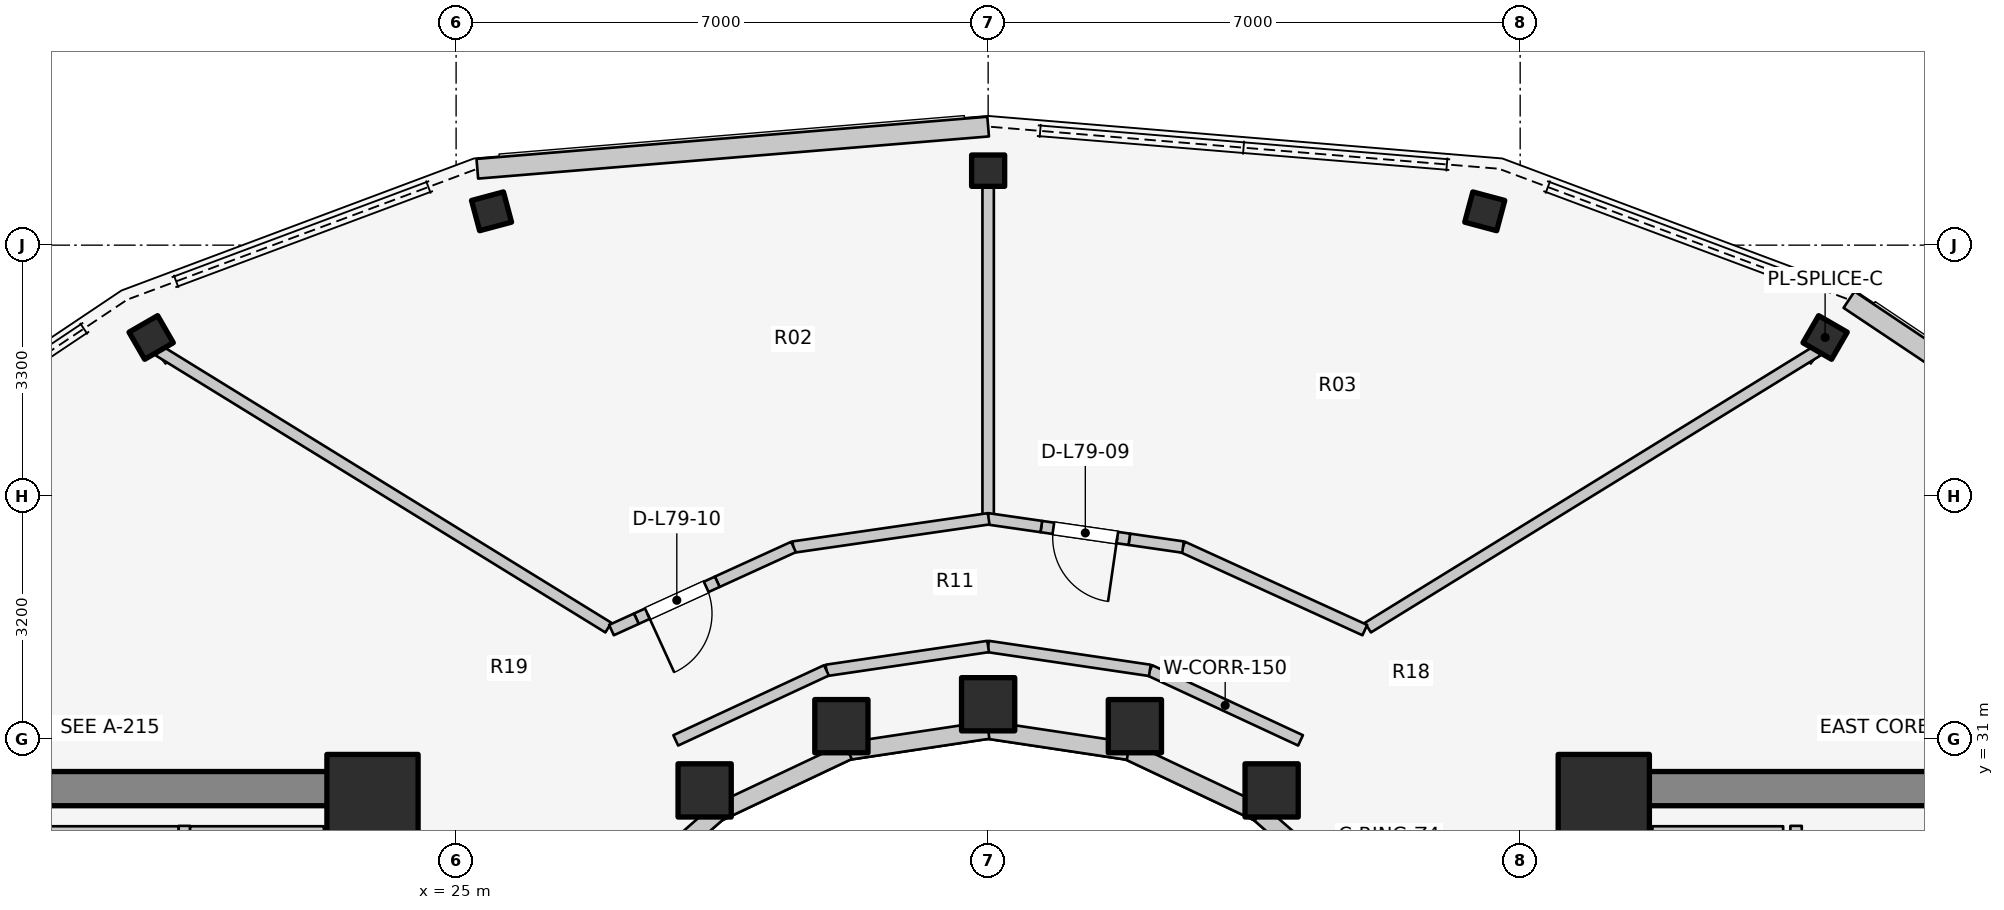
"""IFC4 building model, lengths in metres.
Left out: names, types, materials, properties, quantities, classifications, styles, units other than length and angle.
Written with IfcOpenShell. Run it as: python <this file> out.ifc"""

import sys

from ifc_helpers import new_model, si_unit, direction, frame, frame_2d, origin, origin_2d, place, context, subcontext, project, spatial, rectangle, i_section, extrude, element, fill, save


model = new_model("IFC4")
c1 = context("Model", 3, precision=1e-05, world=origin(), true_north=direction((0.0, 1.0)))
c2 = subcontext(c1, "Body", "Model", "MODEL_VIEW")
j1 = project(units=[si_unit("LENGTHUNIT", "METRE"), si_unit("PLANEANGLEUNIT", "RADIAN")], contexts=[c1])
p1 = place(None, origin())
s1 = spatial("IfcSite", under=j1, at=p1, CompositionType="ELEMENT")
p2 = place(p1, origin())
s2 = spatial("IfcBuilding", under=s1, at=p2, CompositionType="ELEMENT")
p3 = place(p2, frame((0.0, 0.0, 260.4)))
s3 = spatial("IfcBuildingStorey", under=s2, at=p3, CompositionType="ELEMENT", Elevation=260.4)
for number, where, z_axis, x_axis in (
    (1, (19.65, 30.35, 0.0), (0.0, 0.0, 1.0), (1.0, 0.0, 0.0)),
    (2, (39.85, 30.35, 0.0), (0.0, 0.0, 1.0), (1.0, 0.0, 0.0)),
):
    element("IfcWall", number, at=place(p3, frame(where, z_axis=z_axis, x_axis=x_axis)), inside=s3, PredefinedType="SHEAR", context=c2, shape_type="SweptSolid", body=[
        extrude(rectangle(XDim=4.5, YDim=0.45, at=frame_2d((2.25, 0.0))), origin(), (0.0, 0.0, 1.0), 3.2),
    ])
for number, where, z_axis, x_axis in (
    (3, (23.9, 30.2, 0.0), (0.0, 0.0, 1.0), (1.0, 0.0, 0.0)),
    (4, (40.1, 30.2, 0.0), (0.0, 0.0, 1.0), (1.0, 0.0, 0.0)),
):
    element("IfcColumn", number, at=place(p3, frame(where, z_axis=z_axis, x_axis=x_axis)), inside=s3, PredefinedType="COLUMN", context=c2, shape_type="SweptSolid", body=[
        extrude(rectangle(XDim=1.2, YDim=1.2, at=origin_2d()), origin(), (0.0, 0.0, 1.0), 3.2),
    ])
p4 = place(p3, frame((35.73, 30.327, 0.0), z_axis=(0.0, 0.0, 1.0), x_axis=(1.0, 0.0, 0.0)))
e5 = element("IfcColumn", 5, at=p4, inside=s3, PredefinedType="COLUMN", context=c2, shape_type="SweptSolid", body=[
    extrude(rectangle(XDim=0.7, YDim=0.7, at=origin_2d()), origin(), (0.0, 0.0, 1.0), 3.2),
])
p5 = place(p3, frame((43.012, 36.285, 0.0), z_axis=(0.0, 0.0, 1.0), x_axis=(0.5, 0.866025403784, 0.0)))
e6 = element("IfcColumn", 6, at=p5, inside=s3, PredefinedType="COLUMN", context=c2, shape_type="SweptSolid", body=[
    extrude(i_section(OverallWidth=0.412, OverallDepth=0.435, WebThickness=0.036, FlangeThickness=0.057, FilletRadius=0.025, at=origin_2d()), origin(), (0.0, 0.0, 1.0), 3.2),
])
p6 = place(p3, frame((33.931, 31.172, 0.0), z_axis=(0.0, 0.0, 1.0), x_axis=(1.0, 0.0, 0.0)))
e7 = element("IfcColumn", 7, at=p6, inside=s3, PredefinedType="COLUMN", context=c2, shape_type="SweptSolid", body=[
    extrude(rectangle(XDim=0.7, YDim=0.7, at=origin_2d()), origin(), (0.0, 0.0, 1.0), 3.2),
])
p7 = place(p3, frame((38.534, 37.945, 0.0), z_axis=(0.0, 0.0, 1.0), x_axis=(0.258819045103, 0.965925826289, 0.0)))
e8 = element("IfcColumn", 8, at=p7, inside=s3, PredefinedType="COLUMN", context=c2, shape_type="SweptSolid", body=[
    extrude(i_section(OverallWidth=0.412, OverallDepth=0.435, WebThickness=0.036, FlangeThickness=0.057, FilletRadius=0.025, at=origin_2d()), origin(), (0.0, 0.0, 1.0), 3.2),
])
p8 = place(p3, frame((32.0, 31.46, 0.0), z_axis=(0.0, 0.0, 1.0), x_axis=(1.0, 0.0, 0.0)))
e9 = element("IfcColumn", 9, at=p8, inside=s3, PredefinedType="COLUMN", context=c2, shape_type="SweptSolid", body=[
    extrude(rectangle(XDim=0.7, YDim=0.7, at=origin_2d()), origin(), (0.0, 0.0, 1.0), 3.2),
])
p9 = place(p3, frame((32.0, 38.48, 0.0), z_axis=(0.0, 0.0, 1.0), x_axis=(0.0, 1.0, 0.0)))
e10 = element("IfcColumn", 10, at=p9, inside=s3, PredefinedType="COLUMN", context=c2, shape_type="SweptSolid", body=[
    extrude(i_section(OverallWidth=0.412, OverallDepth=0.435, WebThickness=0.036, FlangeThickness=0.057, FilletRadius=0.025, at=origin_2d()), origin(), (0.0, 0.0, 1.0), 3.2),
])
p10 = place(p3, frame((30.069, 31.172, 0.0), z_axis=(0.0, 0.0, 1.0), x_axis=(1.0, 0.0, 0.0)))
e11 = element("IfcColumn", 11, at=p10, inside=s3, PredefinedType="COLUMN", context=c2, shape_type="SweptSolid", body=[
    extrude(rectangle(XDim=0.7, YDim=0.7, at=origin_2d()), origin(), (0.0, 0.0, 1.0), 3.2),
])
p11 = place(p3, frame((25.466, 37.945, 0.0), z_axis=(0.0, 0.0, 1.0), x_axis=(-0.258819045103, 0.965925826289, 0.0)))
e12 = element("IfcColumn", 12, at=p11, inside=s3, PredefinedType="COLUMN", context=c2, shape_type="SweptSolid", body=[
    extrude(i_section(OverallWidth=0.412, OverallDepth=0.435, WebThickness=0.036, FlangeThickness=0.057, FilletRadius=0.025, at=origin_2d()), origin(), (0.0, 0.0, 1.0), 3.2),
])
p12 = place(p3, frame((28.27, 30.327, 0.0), z_axis=(0.0, 0.0, 1.0), x_axis=(1.0, 0.0, 0.0)))
e13 = element("IfcColumn", 13, at=p12, inside=s3, PredefinedType="COLUMN", context=c2, shape_type="SweptSolid", body=[
    extrude(rectangle(XDim=0.7, YDim=0.7, at=origin_2d()), origin(), (0.0, 0.0, 1.0), 3.2),
])
p13 = place(p3, frame((20.988, 36.285, 0.0), z_axis=(0.0, 0.0, 1.0), x_axis=(-0.5, 0.866025403784, 0.0)))
e14 = element("IfcColumn", 14, at=p13, inside=s3, PredefinedType="COLUMN", context=c2, shape_type="SweptSolid", body=[
    extrude(i_section(OverallWidth=0.412, OverallDepth=0.435, WebThickness=0.036, FlangeThickness=0.057, FilletRadius=0.025, at=origin_2d()), origin(), (0.0, 0.0, 1.0), 3.2),
])
p14 = place(p3, frame((37.035, 28.742, 0.0), z_axis=(0.0, 0.0, 1.0), x_axis=(-0.752576694707, 0.658504607869, 0.0)))
e15 = element("IfcWall", 15, at=p14, inside=s3, PredefinedType="STANDARD", context=c2, shape_type="SweptSolid", body=[
    extrude(rectangle(XDim=1.959, YDim=0.23, at=frame_2d((0.98, 0.0))), origin(), (0.0, 0.0, 1.0), 1.32),
])
p15 = place(p3, frame((35.56, 30.032, 0.0), z_axis=(0.0, 0.0, 1.0), x_axis=(-0.904179699603, 0.427152280606, 0.0)))
e16 = element("IfcWall", 16, at=p15, inside=s3, PredefinedType="STANDARD", context=c2, shape_type="SweptSolid", body=[
    extrude(rectangle(XDim=1.899, YDim=0.23, at=frame_2d((0.95, 0.0))), origin(), (0.0, 0.0, 1.0), 1.32),
])
for number, where, z_axis, x_axis in (
    (17, (33.843, 30.843, 0.0), (0.0, 0.0, 1.0), (-0.989, 0.149, 0.0)),
    (18, (32.0, 31.12, 0.0), (0.0, 0.0, 1.0), (-0.989, -0.149, 0.0)),
):
    element("IfcWall", number, at=place(p3, frame(where, z_axis=z_axis, x_axis=x_axis)), inside=s3, PredefinedType="STANDARD", context=c2, shape_type="SweptSolid", body=[
        extrude(rectangle(XDim=1.864, YDim=0.23, at=frame_2d((0.932, 0.0))), origin(), (0.0, 0.0, 1.0), 1.32),
    ])
p16 = place(p3, frame((30.157, 30.843, 0.0), z_axis=(0.0, 0.0, 1.0), x_axis=(-0.904179699603, -0.427152280606, 0.0)))
e19 = element("IfcWall", 19, at=p16, inside=s3, PredefinedType="STANDARD", context=c2, shape_type="SweptSolid", body=[
    extrude(rectangle(XDim=1.899, YDim=0.23, at=frame_2d((0.95, 0.0))), origin(), (0.0, 0.0, 1.0), 1.32),
])
p17 = place(p3, frame((28.44, 30.032, 0.0), z_axis=(0.0, 0.0, 1.0), x_axis=(-0.752576694707, -0.658504607869, 0.0)))
e20 = element("IfcWall", 20, at=p17, inside=s3, PredefinedType="STANDARD", context=c2, shape_type="SweptSolid", body=[
    extrude(rectangle(XDim=1.959, YDim=0.23, at=frame_2d((0.98, 0.0))), origin(), (0.0, 0.0, 1.0), 1.32),
])
p18 = place(p3, frame((46.846, 34.43, 0.0), z_axis=(0.0, 0.0, 1.0), x_axis=(-0.831241989861, 0.555910743098, 0.0)))
e21 = element("IfcWall", 21, at=p18, inside=s3, PredefinedType="STANDARD", context=c2, shape_type="SweptSolid", body=[
    extrude(rectangle(XDim=4.233, YDim=0.26, at=frame_2d((2.117, 0.0))), origin(), (0.0, 0.0, 1.0), 1.32),
])
p19 = place(p3, frame((32.0, 39.06, 0.0), z_axis=(0.0, 0.0, 1.0), x_axis=(-0.99660839131, -0.082290426963, 0.0)))
e22 = element("IfcWall", 22, at=p19, inside=s3, PredefinedType="STANDARD", context=c2, shape_type="SweptSolid", body=[
    extrude(rectangle(XDim=6.744, YDim=0.26, at=frame_2d((3.372, 0.0))), origin(), (0.0, 0.0, 1.0), 1.32),
])
p20 = place(p3, frame((19.59, 29.78, 0.0), z_axis=(0.0, 0.0, 1.0), x_axis=(1.0, 0.0, 0.0)))
e23 = element("IfcWall", 23, at=p20, inside=s3, PredefinedType="SOLIDWALL", context=c2, shape_type="SweptSolid", body=[
    extrude(rectangle(XDim=1.76, YDim=0.15, at=frame_2d((0.88, 0.0))), origin(), (0.0, 0.0, 1.0), 2.915),
])
p21 = place(p3, frame((21.425, 27.14, 0.0), z_axis=(0.0, 0.0, 1.0), x_axis=(0.0, 1.0, 0.0)))
e24 = element("IfcWall", 24, at=p21, inside=s3, PredefinedType="SOLIDWALL", context=c2, shape_type="SweptSolid", body=[
    extrude(rectangle(XDim=2.72, YDim=0.15, at=frame_2d((1.36, 0.0))), origin(), (0.0, 0.0, 1.0), 2.915),
])
p22 = place(p3, frame((21.5, 29.78, 0.0), z_axis=(0.0, 0.0, 1.0), x_axis=(1.0, 0.0, 0.0)))
e25 = element("IfcWall", 25, at=p22, inside=s3, PredefinedType="SOLIDWALL", context=c2, shape_type="SweptSolid", body=[
    extrude(rectangle(XDim=1.76, YDim=0.15, at=frame_2d((0.88, 0.0))), origin(), (0.0, 0.0, 1.0), 2.915),
])
p23 = place(p3, frame((23.43, 27.14, 0.0), z_axis=(0.0, 0.0, 1.0), x_axis=(0.0, 1.0, 0.0)))
e26 = element("IfcWall", 26, at=p23, inside=s3, PredefinedType="SOLIDWALL", context=c2, shape_type="SweptSolid", body=[
    extrude(rectangle(XDim=2.72, YDim=0.15, at=frame_2d((1.36, 0.0))), origin(), (0.0, 0.0, 1.0), 2.915),
])
p24 = place(p3, frame((40.74, 29.78, 0.0), z_axis=(0.0, 0.0, 1.0), x_axis=(1.0, 0.0, 0.0)))
e27 = element("IfcWall", 27, at=p24, inside=s3, PredefinedType="SOLIDWALL", context=c2, shape_type="SweptSolid", body=[
    extrude(rectangle(XDim=1.72, YDim=0.15, at=frame_2d((0.86, 0.0))), origin(), (0.0, 0.0, 1.0), 2.915),
])
for number, where, z_axis, x_axis in (
    (28, (40.57, 27.14, 0.0), (0.0, 0.0, 1.0), (0.0, 1.0, 0.0)),
    (29, (42.63, 27.14, 0.0), (0.0, 0.0, 1.0), (0.0, 1.0, 0.0)),
):
    element("IfcWall", number, at=place(p3, frame(where, z_axis=z_axis, x_axis=x_axis)), inside=s3, PredefinedType="SOLIDWALL", context=c2, shape_type="SweptSolid", body=[
        extrude(rectangle(XDim=2.72, YDim=0.15, at=frame_2d((1.36, 0.0))), origin(), (0.0, 0.0, 1.0), 2.915),
    ])
p25 = place(p3, frame((36.11, 30.985, 0.0), z_axis=(0.0, 0.0, 1.0), x_axis=(-0.906943449489, 0.421252393975, 0.0)))
e30 = element("IfcWall", 30, at=p25, inside=s3, PredefinedType="PARTITIONING", context=c2, shape_type="SweptSolid", body=[
    extrude(rectangle(XDim=2.186, YDim=0.15, at=frame_2d((1.093, 0.0))), origin(), (0.0, 0.0, 1.0), 1.32),
])
for number, where, z_axis, x_axis in (
    (31, (34.127, 31.906, 0.0), (0.0, 0.0, 1.0), (-0.989, 0.146, 0.0)),
    (32, (32.0, 32.22, 0.0), (0.0, 0.0, 1.0), (-0.989, -0.146, 0.0)),
):
    element("IfcWall", number, at=place(p3, frame(where, z_axis=z_axis, x_axis=x_axis)), inside=s3, PredefinedType="PARTITIONING", context=c2, shape_type="SweptSolid", body=[
        extrude(rectangle(XDim=2.151, YDim=0.15, at=frame_2d((1.075, 0.0))), origin(), (0.0, 0.0, 1.0), 1.32),
    ])
p26 = place(p3, frame((29.873, 31.906, 0.0), z_axis=(0.0, 0.0, 1.0), x_axis=(-0.906943449489, -0.421252393975, 0.0)))
e33 = element("IfcWall", 33, at=p26, inside=s3, PredefinedType="PARTITIONING", context=c2, shape_type="SweptSolid", body=[
    extrude(rectangle(XDim=2.186, YDim=0.15, at=frame_2d((1.093, 0.0))), origin(), (0.0, 0.0, 1.0), 1.32),
])
p27 = place(p3, frame((36.997, 32.469, 0.0), z_axis=(0.0, 0.0, 1.0), x_axis=(0.851425368576, 0.524475778035, 0.0)))
e34 = element("IfcWall", 34, at=p27, inside=s3, PredefinedType="PARTITIONING", context=c2, shape_type="SweptSolid", body=[
    extrude(rectangle(XDim=6.948, YDim=0.15, at=frame_2d((3.474, 0.0))), origin(), (0.0, 0.0, 1.0), 1.32),
])
p28 = place(p3, frame((32.0, 33.955, 0.0), z_axis=(0.0, 0.0, 1.0), x_axis=(0.0, 1.0, 0.0)))
e35 = element("IfcWall", 35, at=p28, inside=s3, PredefinedType="PARTITIONING", context=c2, shape_type="SweptSolid", body=[
    extrude(rectangle(XDim=4.325, YDim=0.15, at=frame_2d((2.163, 0.0))), origin(), (0.0, 0.0, 1.0), 1.32),
])
p29 = place(p3, frame((27.003, 32.469, 0.0), z_axis=(0.0, 0.0, 1.0), x_axis=(-0.851425368576, 0.524475778035, 0.0)))
e36 = element("IfcWall", 36, at=p29, inside=s3, PredefinedType="PARTITIONING", context=c2, shape_type="SweptSolid", body=[
    extrude(rectangle(XDim=6.948, YDim=0.15, at=frame_2d((3.474, 0.0))), origin(), (0.0, 0.0, 1.0), 1.32),
])
p30 = place(p3, frame((36.956, 32.436, 0.0), z_axis=(0.0, 0.0, 1.0), x_axis=(-0.909736731002, 0.415185597373, 0.0)))
e37 = element("IfcWall", 37, at=p30, inside=s3, PredefinedType="PARTITIONING", context=c2, shape_type="SweptSolid", body=[
    extrude(rectangle(XDim=2.633, YDim=0.15, at=frame_2d((1.317, 0.0))), origin(), (0.0, 0.0, 1.0), 1.32),
])
p31 = place(p3, frame((34.564, 33.528, 0.0), z_axis=(0.0, 0.0, 1.0), x_axis=(-0.98967396594, 0.143336810138, 0.0)))
e38 = element("IfcWall", 38, at=p31, inside=s3, PredefinedType="PARTITIONING", context=c2, shape_type="SweptSolid", body=[
    extrude(rectangle(XDim=0.714, YDim=0.15, at=frame_2d((0.357, 0.0))), origin(), (0.0, 0.0, 1.0), 2.915),
])
p32 = place(p3, frame((33.858, 33.63, 0.0), z_axis=(0.0, 0.0, 1.0), x_axis=(-0.989701767603, 0.143144721184, 0.0)))
e39 = element("IfcWall", 39, at=p32, inside=s3, PredefinedType="PARTITIONING", context=c2, shape_type="SweptSolid", body=[
    extrude(rectangle(XDim=1.17, YDim=0.15, at=frame_2d((0.585, 0.0))), origin(), (0.0, 0.0, 1.0), 2.915),
])
p33 = place(p32, frame((0.16, 0.0, 0.0)))
e40 = element("IfcOpeningElement", 40, at=p33, cuts=e39, PredefinedType="OPENING", context=c2, shape_type="SweptSolid", body=[
    extrude(rectangle(XDim=0.85, YDim=2.05, at=frame_2d((0.425, 1.025))), frame((0.0, 0.085, 0.0), z_axis=(0.0, -1.0, 0.0), x_axis=(1.0, 0.0, 0.0)), (0.0, 0.0, 1.0), 0.17),
])
p34 = place(p3, frame((32.7, 33.798, 0.0), z_axis=(0.0, 0.0, 1.0), x_axis=(-0.989729432137, 0.142953318118, 0.0)))
e41 = element("IfcWall", 41, at=p34, inside=s3, PredefinedType="PARTITIONING", context=c2, shape_type="SweptSolid", body=[
    extrude(rectangle(XDim=0.714, YDim=0.15, at=frame_2d((0.357, 0.0))), origin(), (0.0, 0.0, 1.0), 1.32),
])
p35 = place(p3, frame((32.007, 33.9, 0.0), z_axis=(0.0, 0.0, 1.0), x_axis=(-0.989701742337, -0.143144895876, 0.0)))
e42 = element("IfcWall", 42, at=p35, inside=s3, PredefinedType="PARTITIONING", context=c2, shape_type="SweptSolid", body=[
    extrude(rectangle(XDim=2.598, YDim=0.15, at=frame_2d((1.299, 0.0))), origin(), (0.0, 0.0, 1.0), 1.32),
])
p36 = place(p3, frame((29.439, 33.529, 0.0), z_axis=(0.0, 0.0, 1.0), x_axis=(-0.909797051829, -0.415053399557, 0.0)))
e43 = element("IfcWall", 43, at=p36, inside=s3, PredefinedType="PARTITIONING", context=c2, shape_type="SweptSolid", body=[
    extrude(rectangle(XDim=1.103, YDim=0.15, at=frame_2d((0.551, 0.0))), origin(), (0.0, 0.0, 1.0), 1.32),
])
p37 = place(p3, frame((28.436, 33.071, 0.0), z_axis=(0.0, 0.0, 1.0), x_axis=(-0.90972227288, -0.415217275925, 0.0)))
e44 = element("IfcWall", 44, at=p37, inside=s3, PredefinedType="PARTITIONING", context=c2, shape_type="SweptSolid", body=[
    extrude(rectangle(XDim=1.17, YDim=0.15, at=frame_2d((0.585, 0.0))), origin(), (0.0, 0.0, 1.0), 2.11),
])
p38 = place(p37, frame((0.16, 0.0, 0.0)))
e45 = element("IfcOpeningElement", 45, at=p38, cuts=e44, PredefinedType="OPENING", context=c2, shape_type="SweptSolid", body=[
    extrude(rectangle(XDim=0.85, YDim=2.05, at=frame_2d((0.425, 1.025))), frame((0.0, 0.085, 0.0), z_axis=(0.0, -1.0, 0.0), x_axis=(1.0, 0.0, 0.0)), (0.0, 0.0, 1.0), 0.17),
])
p39 = place(p3, frame((27.372, 32.585, 0.0), z_axis=(0.0, 0.0, 1.0), x_axis=(-0.909598918169, -0.415487434305, 0.0)))
e46 = element("IfcWall", 46, at=p39, inside=s3, PredefinedType="PARTITIONING", context=c2, shape_type="SweptSolid", body=[
    extrude(rectangle(XDim=0.36, YDim=0.15, at=frame_2d((0.18, 0.0))), origin(), (0.0, 0.0, 1.0), 2.915),
])
p40 = place(p33, origin())
e47 = element("IfcDoor", 47, at=p40, inside=s3, OperationType="SINGLE_SWING_LEFT", PredefinedType="DOOR", context=c2, shape_type="SweptSolid", body=[
    extrude(rectangle(XDim=0.85, YDim=2.05, at=frame_2d((0.425, 1.025))), frame((0.0, 0.025, 0.0), z_axis=(0.0, -1.0, 0.0), x_axis=(1.0, 0.0, 0.0)), (0.0, 0.0, 1.0), 0.05),
])
fill(e40, e47)
p41 = place(p38, origin())
e48 = element("IfcDoor", 48, at=p41, inside=s3, OperationType="SINGLE_SWING_RIGHT", PredefinedType="DOOR", context=c2, shape_type="SweptSolid", body=[
    extrude(rectangle(XDim=0.85, YDim=2.05, at=frame_2d((0.425, 1.025))), frame((0.0, 0.025, 0.0), z_axis=(0.0, -1.0, 0.0), x_axis=(1.0, 0.0, 0.0)), (0.0, 0.0, 1.0), 0.05),
])
fill(e45, e48)
save(model, sys.argv[1])
